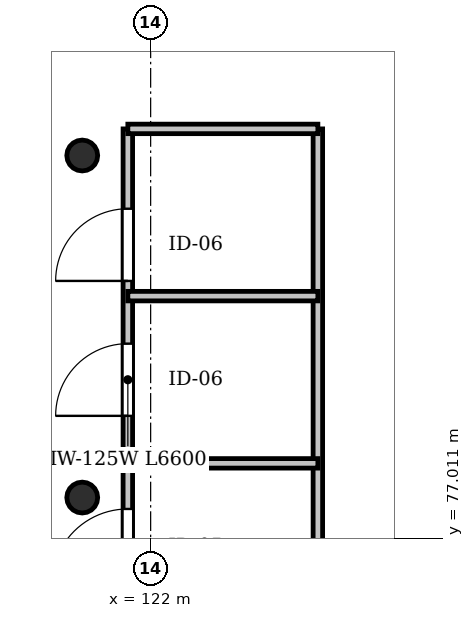
"""IFC4 building model, lengths in metres.
Left out: names, types, materials, properties, quantities, classifications, styles, units other than length and angle.
Written with IfcOpenShell. Run it as: python <this file> out.ifc"""

import sys

from ifc_helpers import new_model, si_unit, direction, frame, frame_2d, origin, origin_2d, place, context, subcontext, project, spatial, rectangle, hollow_circle, extrude, element, fill, save


model = new_model("IFC4")
c1 = context("Model", 3, precision=1e-05, world=origin(), true_north=direction((0.0, 1.0)))
c2 = subcontext(c1, "Body", "Model", "MODEL_VIEW")
j1 = project(units=[si_unit("LENGTHUNIT", "METRE"), si_unit("PLANEANGLEUNIT", "RADIAN")], contexts=[c1])
p1 = place(None, origin())
s1 = spatial("IfcSite", under=j1, at=p1, CompositionType="ELEMENT")
p2 = place(p1, origin())
s2 = spatial("IfcBuilding", under=s1, at=p2, CompositionType="ELEMENT")
p3 = place(p2, origin())
s3 = spatial("IfcBuildingStorey", under=s2, at=p3, CompositionType="ELEMENT", Elevation=0.0)
for number, where, z_axis, x_axis in (
    (1, (121.1, 77.55, 0.0), (0.0, 0.0, 1.0), (1.0, 0.0, 0.0)),
    (2, (121.1, 82.05, 0.0), (0.0, 0.0, 1.0), (1.0, 0.0, 0.0)),
):
    element("IfcColumn", number, at=place(p3, frame(where, z_axis=z_axis, x_axis=x_axis)), inside=s3, PredefinedType="COLUMN", context=c2, shape_type="SweptSolid", body=[
        extrude(hollow_circle(Radius=0.203, WallThickness=0.016, at=origin_2d()), origin(), (0.0, 0.0, 1.0), 5.4),
    ])
p4 = place(p3, frame((121.7, 75.8, 0.0), z_axis=(0.0, 0.0, 1.0), x_axis=(0.0, 1.0, 0.0)))
e3 = element("IfcWall", 3, at=p4, inside=s3, PredefinedType="PARTITIONING", context=c2, shape_type="SweptSolid", body=[
    extrude(rectangle(XDim=6.6, YDim=0.125, at=frame_2d((3.3, 0.0))), origin(), (0.0, 0.0, 1.0), 5.05),
])
p5 = place(p4, frame((0.6, 0.0, 0.0)))
e4 = element("IfcOpeningElement", 4, at=p5, cuts=e3, PredefinedType="OPENING", context=c2, shape_type="SweptSolid", body=[
    extrude(rectangle(XDim=1.0, YDim=2.2, at=frame_2d((0.5, 1.1))), frame((0.0, 0.073, 0.0), z_axis=(0.0, -1.0, 0.0), x_axis=(1.0, 0.0, 0.0)), (0.0, 0.0, 1.0), 0.145),
])
p6 = place(p4, frame((2.825, 0.0, 0.0)))
e5 = element("IfcOpeningElement", 5, at=p6, cuts=e3, PredefinedType="OPENING", context=c2, shape_type="SweptSolid", body=[
    extrude(rectangle(XDim=0.95, YDim=2.2, at=frame_2d((0.475, 1.1))), frame((0.0, 0.073, 0.0), z_axis=(0.0, -1.0, 0.0), x_axis=(1.0, 0.0, 0.0)), (0.0, 0.0, 1.0), 0.145),
])
p7 = place(p4, frame((4.6, 0.0, 0.0)))
e6 = element("IfcOpeningElement", 6, at=p7, cuts=e3, PredefinedType="OPENING", context=c2, shape_type="SweptSolid", body=[
    extrude(rectangle(XDim=0.95, YDim=2.2, at=frame_2d((0.475, 1.1))), frame((0.0, 0.073, 0.0), z_axis=(0.0, -1.0, 0.0), x_axis=(1.0, 0.0, 0.0)), (0.0, 0.0, 1.0), 0.145),
])
p8 = place(p3, frame((124.2, 75.8, 0.0), z_axis=(0.0, 0.0, 1.0), x_axis=(0.0, 1.0, 0.0)))
e7 = element("IfcWall", 7, at=p8, inside=s3, PredefinedType="PARTITIONING", context=c2, shape_type="SweptSolid", body=[
    extrude(rectangle(XDim=6.6, YDim=0.125, at=frame_2d((3.3, 0.0))), origin(), (0.0, 0.0, 1.0), 5.05),
])
for number, where, z_axis, x_axis in (
    (8, (121.7, 82.4, 0.0), (0.0, 0.0, 1.0), (1.0, 0.0, 0.0)),
    (9, (121.7, 78.0, 0.0), (0.0, 0.0, 1.0), (1.0, 0.0, 0.0)),
    (10, (121.7, 80.2, 0.0), (0.0, 0.0, 1.0), (1.0, 0.0, 0.0)),
):
    element("IfcWall", number, at=place(p3, frame(where, z_axis=z_axis, x_axis=x_axis)), inside=s3, PredefinedType="PARTITIONING", context=c2, shape_type="SweptSolid", body=[
        extrude(rectangle(XDim=2.5, YDim=0.125, at=frame_2d((1.25, 0.0))), origin(), (0.0, 0.0, 1.0), 4.45),
    ])
p9 = place(p5, origin())
e11 = element("IfcDoor", 11, at=p9, inside=s3, OperationType="SINGLE_SWING_LEFT", PredefinedType="DOOR", context=c2, shape_type="SweptSolid", body=[
    extrude(rectangle(XDim=1.0, YDim=2.2, at=frame_2d((0.5, 1.1))), frame((0.0, 0.025, 0.0), z_axis=(0.0, -1.0, 0.0), x_axis=(1.0, 0.0, 0.0)), (0.0, 0.0, 1.0), 0.05),
])
fill(e4, e11)
p10 = place(p6, origin())
e12 = element("IfcDoor", 12, at=p10, inside=s3, OperationType="SINGLE_SWING_RIGHT", PredefinedType="DOOR", context=c2, shape_type="SweptSolid", body=[
    extrude(rectangle(XDim=0.95, YDim=2.2, at=frame_2d((0.475, 1.1))), frame((0.0, 0.025, 0.0), z_axis=(0.0, -1.0, 0.0), x_axis=(1.0, 0.0, 0.0)), (0.0, 0.0, 1.0), 0.05),
])
fill(e5, e12)
p11 = place(p7, origin())
e13 = element("IfcDoor", 13, at=p11, inside=s3, OperationType="SINGLE_SWING_LEFT", PredefinedType="DOOR", context=c2, shape_type="SweptSolid", body=[
    extrude(rectangle(XDim=0.95, YDim=2.2, at=frame_2d((0.475, 1.1))), frame((0.0, 0.025, 0.0), z_axis=(0.0, -1.0, 0.0), x_axis=(1.0, 0.0, 0.0)), (0.0, 0.0, 1.0), 0.05),
])
fill(e6, e13)
save(model, sys.argv[1])
